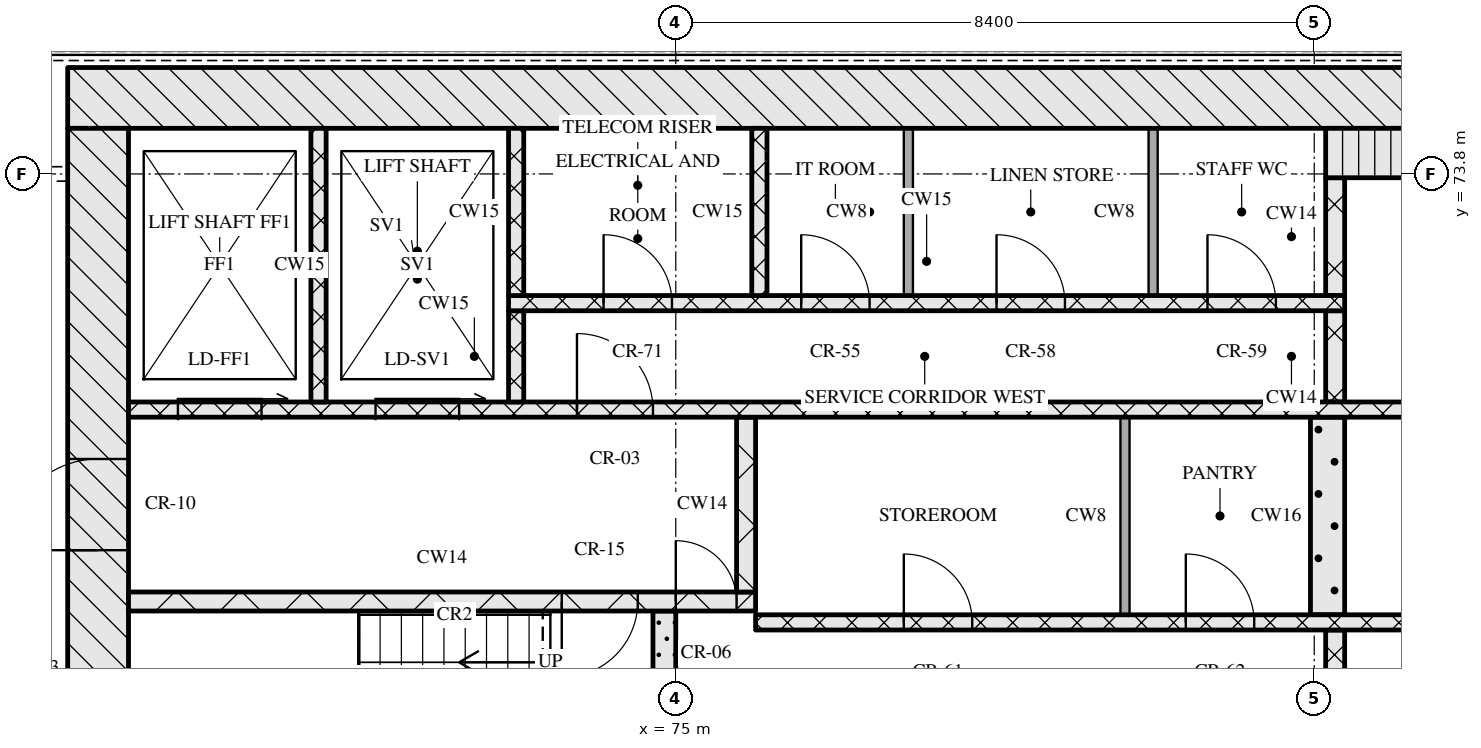
"""IFC4 building model, lengths in metres.
Left out: names, types, materials, properties, quantities, classifications, styles, units other than length and angle.
Written with IfcOpenShell. Run it as: python <this file> out.ifc"""

import sys

from ifc_helpers import new_model, si_unit, direction, frame, frame_2d, origin, place, context, subcontext, project, spatial, rectangle, extrude, element, fill, save


model = new_model("IFC4")
c1 = context("Model", 3, precision=1e-05, world=origin(), true_north=direction((0.0, 1.0)))
c2 = subcontext(c1, "Body", "Model", "MODEL_VIEW")
j1 = project(units=[si_unit("LENGTHUNIT", "METRE"), si_unit("PLANEANGLEUNIT", "RADIAN")], contexts=[c1])
p1 = place(None, origin())
s1 = spatial("IfcSite", under=j1, at=p1, CompositionType="ELEMENT")
p2 = place(p1, origin())
s2 = spatial("IfcBuilding", under=s1, at=p2, CompositionType="ELEMENT")
p3 = place(p2, frame((0.0, 0.0, 190.65)))
s3 = spatial("IfcBuildingStorey", under=s2, at=p3, CompositionType="ELEMENT", Elevation=190.65)
p4 = place(p3, frame((67.0, 74.8, 0.0), z_axis=(0.0, 0.0, 1.0), x_axis=(1.0, 0.0, 0.0)))
e1 = element("IfcWall", 1, at=p4, inside=s3, PredefinedType="SOLIDWALL", context=c2, shape_type="SweptSolid", body=[
    extrude(rectangle(XDim=41.2, YDim=0.8, at=frame_2d((20.6, 0.0))), origin(), (0.0, 0.0, 1.0), 3.3),
])
p5 = place(p3, frame((67.4, 62.4, 0.0), z_axis=(0.0, 0.0, 1.0), x_axis=(0.0, 1.0, 0.0)))
e2 = element("IfcWall", 2, at=p5, inside=s3, PredefinedType="SOLIDWALL", context=c2, shape_type="SweptSolid", body=[
    extrude(rectangle(XDim=12.0, YDim=0.8, at=frame_2d((6.0, 0.0))), origin(), (0.0, 0.0, 1.0), 3.3),
])
p6 = place(p5, frame((6.45, 0.0, 0.0)))
e3 = element("IfcOpeningElement", 3, at=p6, cuts=e2, PredefinedType="OPENING", context=c2, shape_type="SweptSolid", body=[
    extrude(rectangle(XDim=1.2, YDim=2.1, at=frame_2d((0.6, 1.05))), frame((0.0, 0.41, 0.0), z_axis=(0.0, -1.0, 0.0), x_axis=(1.0, 0.0, 0.0)), (0.0, 0.0, 1.0), 0.82),
])
p7 = place(p3, frame((74.85, 65.2, 0.0), z_axis=(0.0, 0.0, 1.0), x_axis=(0.0, 1.0, 0.0)))
e4 = element("IfcWall", 4, at=p7, inside=s3, PredefinedType="SOLIDWALL", context=c2, shape_type="SweptSolid", body=[
    extrude(rectangle(XDim=2.85, YDim=0.3, at=frame_2d((1.425, 0.0))), origin(), (0.0, 0.0, 1.0), 3.3),
])
p8 = place(p3, frame((83.675, 65.2, 0.0), z_axis=(0.0, 0.0, 1.0), x_axis=(0.0, 1.0, 0.0)))
e5 = element("IfcWall", 5, at=p8, inside=s3, PredefinedType="SOLIDWALL", context=c2, shape_type="SweptSolid", body=[
    extrude(rectangle(XDim=2.6, YDim=0.25, at=frame_2d((1.3, 0.0))), origin(), (0.0, 0.0, 1.0), 3.3),
])
p9 = place(p8, frame((0.7, 0.0, 0.0)))
e6 = element("IfcOpeningElement", 6, at=p9, cuts=e5, PredefinedType="OPENING", context=c2, shape_type="SweptSolid", body=[
    extrude(rectangle(XDim=1.2, YDim=2.1, at=frame_2d((0.6, 1.05))), frame((0.0, 0.135, 0.0), z_axis=(0.0, -1.0, 0.0), x_axis=(1.0, 0.0, 0.0)), (0.0, 0.0, 1.0), 0.27),
])
p10 = place(p3, frame((76.05, 67.9, 0.0), z_axis=(0.0, 0.0, 1.0), x_axis=(1.0, 0.0, 0.0)))
e7 = element("IfcWall", 7, at=p10, inside=s3, PredefinedType="SOLIDWALL", context=c2, shape_type="SweptSolid", body=[
    extrude(rectangle(XDim=23.1, YDim=0.2, at=frame_2d((11.55, 0.0))), origin(), (0.0, 0.0, 1.0), 3.3),
])
p11 = place(p10, frame((1.95, 0.0, 0.0)))
e8 = element("IfcOpeningElement", 8, at=p11, cuts=e7, PredefinedType="OPENING", context=c2, shape_type="SweptSolid", body=[
    extrude(rectangle(XDim=0.9, YDim=2.1, at=frame_2d((0.45, 1.05))), frame((0.0, 0.11, 0.0), z_axis=(0.0, -1.0, 0.0), x_axis=(1.0, 0.0, 0.0)), (0.0, 0.0, 1.0), 0.22),
])
p12 = place(p10, frame((5.66, 0.0, 0.0)))
e9 = element("IfcOpeningElement", 9, at=p12, cuts=e7, PredefinedType="OPENING", context=c2, shape_type="SweptSolid", body=[
    extrude(rectangle(XDim=0.9, YDim=2.1, at=frame_2d((0.45, 1.05))), frame((0.0, 0.11, 0.0), z_axis=(0.0, -1.0, 0.0), x_axis=(1.0, 0.0, 0.0)), (0.0, 0.0, 1.0), 0.22),
])
p13 = place(p10, frame((9.7, 0.0, 0.0)))
e10 = element("IfcOpeningElement", 10, at=p13, cuts=e7, PredefinedType="OPENING", context=c2, shape_type="SweptSolid", body=[
    extrude(rectangle(XDim=0.9, YDim=2.1, at=frame_2d((0.45, 1.05))), frame((0.0, 0.11, 0.0), z_axis=(0.0, -1.0, 0.0), x_axis=(1.0, 0.0, 0.0)), (0.0, 0.0, 1.0), 0.22),
])
p14 = place(p10, frame((13.55, 0.0, 0.0)))
e11 = element("IfcOpeningElement", 11, at=p14, cuts=e7, PredefinedType="OPENING", context=c2, shape_type="SweptSolid", body=[
    extrude(rectangle(XDim=1.0, YDim=2.1, at=frame_2d((0.5, 1.05))), frame((0.0, 0.11, 0.0), z_axis=(0.0, -1.0, 0.0), x_axis=(1.0, 0.0, 0.0)), (0.0, 0.0, 1.0), 0.22),
])
p15 = place(p10, frame((16.2, 0.0, 0.0)))
e12 = element("IfcOpeningElement", 12, at=p15, cuts=e7, PredefinedType="OPENING", context=c2, shape_type="SweptSolid", body=[
    extrude(rectangle(XDim=1.1, YDim=2.1, at=frame_2d((0.55, 1.05))), frame((0.0, 0.11, 0.0), z_axis=(0.0, -1.0, 0.0), x_axis=(1.0, 0.0, 0.0)), (0.0, 0.0, 1.0), 0.22),
])
p16 = place(p10, frame((18.7, 0.0, 0.0)))
e13 = element("IfcOpeningElement", 13, at=p16, cuts=e7, PredefinedType="OPENING", context=c2, shape_type="SweptSolid", body=[
    extrude(rectangle(XDim=1.1, YDim=2.1, at=frame_2d((0.55, 1.05))), frame((0.0, 0.11, 0.0), z_axis=(0.0, -1.0, 0.0), x_axis=(1.0, 0.0, 0.0)), (0.0, 0.0, 1.0), 0.22),
])
p17 = place(p10, frame((21.2, 0.0, 0.0)))
e14 = element("IfcOpeningElement", 14, at=p17, cuts=e7, PredefinedType="OPENING", context=c2, shape_type="SweptSolid", body=[
    extrude(rectangle(XDim=1.1, YDim=2.1, at=frame_2d((0.55, 1.05))), frame((0.0, 0.11, 0.0), z_axis=(0.0, -1.0, 0.0), x_axis=(1.0, 0.0, 0.0)), (0.0, 0.0, 1.0), 0.22),
])
p18 = place(p3, frame((80.91, 68.0, 0.0), z_axis=(0.0, 0.0, 1.0), x_axis=(0.0, 1.0, 0.0)))
e15 = element("IfcWall", 15, at=p18, inside=s3, PredefinedType="PARTITIONING", context=c2, shape_type="SweptSolid", body=[
    extrude(rectangle(XDim=2.6, YDim=0.12, at=frame_2d((1.3, 0.0))), origin(), (0.0, 0.0, 1.0), 3.3),
])
p19 = place(p3, frame((83.575, 68.0, 0.0), z_axis=(0.0, 0.0, 1.0), x_axis=(0.0, 1.0, 0.0)))
e16 = element("IfcWall", 16, at=p19, inside=s3, PredefinedType="SOLIDWALL", context=c2, shape_type="SweptSolid", body=[
    extrude(rectangle(XDim=2.6, YDim=0.45, at=frame_2d((1.3, 0.0))), origin(), (0.0, 0.0, 1.0), 3.3),
])
p20 = place(p3, frame((67.8, 68.175, 0.0), z_axis=(0.0, 0.0, 1.0), x_axis=(1.0, 0.0, 0.0)))
e17 = element("IfcWall", 17, at=p20, inside=s3, PredefinedType="SOLIDWALL", context=c2, shape_type="SweptSolid", body=[
    extrude(rectangle(XDim=8.25, YDim=0.25, at=frame_2d((4.125, 0.0))), origin(), (0.0, 0.0, 1.0), 3.3),
])
p21 = place(p20, frame((5.7, 0.0, 0.0)))
e18 = element("IfcOpeningElement", 18, at=p21, cuts=e17, PredefinedType="OPENING", context=c2, shape_type="SweptSolid", body=[
    extrude(rectangle(XDim=1.0, YDim=2.1, at=frame_2d((0.5, 1.05))), frame((0.0, 0.135, 0.0), z_axis=(0.0, -1.0, 0.0), x_axis=(1.0, 0.0, 0.0)), (0.0, 0.0, 1.0), 0.27),
])
p22 = place(p20, frame((7.2, 0.0, 0.0)))
e19 = element("IfcOpeningElement", 19, at=p22, cuts=e17, PredefinedType="OPENING", context=c2, shape_type="SweptSolid", body=[
    extrude(rectangle(XDim=0.8, YDim=2.1, at=frame_2d((0.4, 1.05))), frame((0.0, 0.135, 0.0), z_axis=(0.0, -1.0, 0.0), x_axis=(1.0, 0.0, 0.0)), (0.0, 0.0, 1.0), 0.27),
])
p23 = place(p3, frame((75.925, 68.3, 0.0), z_axis=(0.0, 0.0, 1.0), x_axis=(0.0, 1.0, 0.0)))
e20 = element("IfcWall", 20, at=p23, inside=s3, PredefinedType="SOLIDWALL", context=c2, shape_type="SweptSolid", body=[
    extrude(rectangle(XDim=2.3, YDim=0.25, at=frame_2d((1.15, 0.0))), origin(), (0.0, 0.0, 1.0), 3.3),
])
p24 = place(p3, frame((67.8, 70.7, 0.0), z_axis=(0.0, 0.0, 1.0), x_axis=(1.0, 0.0, 0.0)))
e21 = element("IfcWall", 21, at=p24, inside=s3, PredefinedType="SOLIDWALL", context=c2, shape_type="SweptSolid", body=[
    extrude(rectangle(XDim=39.6, YDim=0.2, at=frame_2d((19.8, 0.0))), origin(), (0.0, 0.0, 1.0), 3.3),
])
p25 = place(p24, frame((0.65, 0.0, 0.0)))
e22 = element("IfcOpeningElement", 22, at=p25, cuts=e21, PredefinedType="OPENING", context=c2, shape_type="SweptSolid", body=[
    extrude(rectangle(XDim=1.1, YDim=2.1, at=frame_2d((0.55, 1.05))), frame((0.0, 0.11, 0.0), z_axis=(0.0, -1.0, 0.0), x_axis=(1.0, 0.0, 0.0)), (0.0, 0.0, 1.0), 0.22),
])
p26 = place(p24, frame((3.25, 0.0, 0.0)))
e23 = element("IfcOpeningElement", 23, at=p26, cuts=e21, PredefinedType="OPENING", context=c2, shape_type="SweptSolid", body=[
    extrude(rectangle(XDim=1.1, YDim=2.1, at=frame_2d((0.55, 1.05))), frame((0.0, 0.11, 0.0), z_axis=(0.0, -1.0, 0.0), x_axis=(1.0, 0.0, 0.0)), (0.0, 0.0, 1.0), 0.22),
])
p27 = place(p24, frame((5.9, 0.0, 0.0)))
e24 = element("IfcOpeningElement", 24, at=p27, cuts=e21, PredefinedType="OPENING", context=c2, shape_type="SweptSolid", body=[
    extrude(rectangle(XDim=1.0, YDim=2.1, at=frame_2d((0.5, 1.05))), frame((0.0, 0.11, 0.0), z_axis=(0.0, -1.0, 0.0), x_axis=(1.0, 0.0, 0.0)), (0.0, 0.0, 1.0), 0.22),
])
p28 = place(p24, frame((21.7, 0.0, 0.0)))
e25 = element("IfcOpeningElement", 25, at=p28, cuts=e21, PredefinedType="OPENING", context=c2, shape_type="SweptSolid", body=[
    extrude(rectangle(XDim=1.0, YDim=2.1, at=frame_2d((0.5, 1.05))), frame((0.0, 0.11, 0.0), z_axis=(0.0, -1.0, 0.0), x_axis=(1.0, 0.0, 0.0)), (0.0, 0.0, 1.0), 0.22),
])
p29 = place(p24, frame((32.7, 0.0, 0.0)))
e26 = element("IfcOpeningElement", 26, at=p29, cuts=e21, PredefinedType="OPENING", context=c2, shape_type="SweptSolid", body=[
    extrude(rectangle(XDim=1.0, YDim=2.1, at=frame_2d((0.5, 1.05))), frame((0.0, 0.11, 0.0), z_axis=(0.0, -1.0, 0.0), x_axis=(1.0, 0.0, 0.0)), (0.0, 0.0, 1.0), 0.22),
])
p30 = place(p24, frame((35.25, 0.0, 0.0)))
e27 = element("IfcOpeningElement", 27, at=p30, cuts=e21, PredefinedType="OPENING", context=c2, shape_type="SweptSolid", body=[
    extrude(rectangle(XDim=1.1, YDim=2.1, at=frame_2d((0.55, 1.05))), frame((0.0, 0.11, 0.0), z_axis=(0.0, -1.0, 0.0), x_axis=(1.0, 0.0, 0.0)), (0.0, 0.0, 1.0), 0.22),
])
p31 = place(p24, frame((37.85, 0.0, 0.0)))
e28 = element("IfcOpeningElement", 28, at=p31, cuts=e21, PredefinedType="OPENING", context=c2, shape_type="SweptSolid", body=[
    extrude(rectangle(XDim=1.1, YDim=2.1, at=frame_2d((0.55, 1.05))), frame((0.0, 0.11, 0.0), z_axis=(0.0, -1.0, 0.0), x_axis=(1.0, 0.0, 0.0)), (0.0, 0.0, 1.0), 0.22),
])
p32 = place(p3, frame((70.3, 70.8, 0.0), z_axis=(0.0, 0.0, 1.0), x_axis=(0.0, 1.0, 0.0)))
e29 = element("IfcWall", 29, at=p32, inside=s3, PredefinedType="SOLIDWALL", context=c2, shape_type="SweptSolid", body=[
    extrude(rectangle(XDim=3.6, YDim=0.2, at=frame_2d((1.8, 0.0))), origin(), (0.0, 0.0, 1.0), 3.3),
])
p33 = place(p3, frame((72.9, 70.8, 0.0), z_axis=(0.0, 0.0, 1.0), x_axis=(0.0, 1.0, 0.0)))
e30 = element("IfcWall", 30, at=p33, inside=s3, PredefinedType="SOLIDWALL", context=c2, shape_type="SweptSolid", body=[
    extrude(rectangle(XDim=1.2, YDim=0.2, at=frame_2d((0.6, 0.0))), origin(), (0.0, 0.0, 1.0), 3.3),
])
p34 = place(p3, frame((83.675, 70.8, 0.0), z_axis=(0.0, 0.0, 1.0), x_axis=(0.0, 1.0, 0.0)))
e31 = element("IfcWall", 31, at=p34, inside=s3, PredefinedType="SOLIDWALL", context=c2, shape_type="SweptSolid", body=[
    extrude(rectangle(XDim=1.2, YDim=0.25, at=frame_2d((0.6, 0.0))), origin(), (0.0, 0.0, 1.0), 3.3),
])
p35 = place(p3, frame((72.8, 72.1, 0.0), z_axis=(0.0, 0.0, 1.0), x_axis=(1.0, 0.0, 0.0)))
e32 = element("IfcWall", 32, at=p35, inside=s3, PredefinedType="SOLIDWALL", context=c2, shape_type="SweptSolid", body=[
    extrude(rectangle(XDim=11.0, YDim=0.2, at=frame_2d((5.5, 0.0))), origin(), (0.0, 0.0, 1.0), 3.3),
])
p36 = place(p35, frame((1.25, 0.0, 0.0)))
e33 = element("IfcOpeningElement", 33, at=p36, cuts=e32, PredefinedType="OPENING", context=c2, shape_type="SweptSolid", body=[
    extrude(rectangle(XDim=0.9, YDim=2.1, at=frame_2d((0.45, 1.05))), frame((0.0, 0.11, 0.0), z_axis=(0.0, -1.0, 0.0), x_axis=(1.0, 0.0, 0.0)), (0.0, 0.0, 1.0), 0.22),
])
p37 = place(p35, frame((3.85, 0.0, 0.0)))
e34 = element("IfcOpeningElement", 34, at=p37, cuts=e32, PredefinedType="OPENING", context=c2, shape_type="SweptSolid", body=[
    extrude(rectangle(XDim=0.9, YDim=2.1, at=frame_2d((0.45, 1.05))), frame((0.0, 0.11, 0.0), z_axis=(0.0, -1.0, 0.0), x_axis=(1.0, 0.0, 0.0)), (0.0, 0.0, 1.0), 0.22),
])
p38 = place(p35, frame((6.42, 0.0, 0.0)))
e35 = element("IfcOpeningElement", 35, at=p38, cuts=e32, PredefinedType="OPENING", context=c2, shape_type="SweptSolid", body=[
    extrude(rectangle(XDim=0.9, YDim=2.1, at=frame_2d((0.45, 1.05))), frame((0.0, 0.11, 0.0), z_axis=(0.0, -1.0, 0.0), x_axis=(1.0, 0.0, 0.0)), (0.0, 0.0, 1.0), 0.22),
])
p39 = place(p35, frame((9.195, 0.0, 0.0)))
e36 = element("IfcOpeningElement", 36, at=p39, cuts=e32, PredefinedType="OPENING", context=c2, shape_type="SweptSolid", body=[
    extrude(rectangle(XDim=0.9, YDim=2.1, at=frame_2d((0.45, 1.05))), frame((0.0, 0.11, 0.0), z_axis=(0.0, -1.0, 0.0), x_axis=(1.0, 0.0, 0.0)), (0.0, 0.0, 1.0), 0.22),
])
for number, where, z_axis, x_axis in (
    (37, (72.9, 72.2, 0.0), (0.0, 0.0, 1.0), (0.0, 1.0, 0.0)),
    (38, (76.1, 72.2, 0.0), (0.0, 0.0, 1.0), (0.0, 1.0, 0.0)),
):
    element("IfcWall", number, at=place(p3, frame(where, z_axis=z_axis, x_axis=x_axis)), inside=s3, PredefinedType="SOLIDWALL", context=c2, shape_type="SweptSolid", body=[
        extrude(rectangle(XDim=2.2, YDim=0.2, at=frame_2d((1.1, 0.0))), origin(), (0.0, 0.0, 1.0), 3.3),
    ])
for number, where, z_axis, x_axis in (
    (39, (78.06, 72.2, 0.0), (0.0, 0.0, 1.0), (0.0, 1.0, 0.0)),
    (40, (81.28, 72.2, 0.0), (0.0, 0.0, 1.0), (0.0, 1.0, 0.0)),
):
    element("IfcWall", number, at=place(p3, frame(where, z_axis=z_axis, x_axis=x_axis)), inside=s3, PredefinedType="PARTITIONING", context=c2, shape_type="SweptSolid", body=[
        extrude(rectangle(XDim=2.2, YDim=0.12, at=frame_2d((1.1, 0.0))), origin(), (0.0, 0.0, 1.0), 3.3),
    ])
p40 = place(p3, frame((83.675, 72.2, 0.0), z_axis=(0.0, 0.0, 1.0), x_axis=(0.0, 1.0, 0.0)))
e41 = element("IfcWall", 41, at=p40, inside=s3, PredefinedType="SOLIDWALL", context=c2, shape_type="SweptSolid", body=[
    extrude(rectangle(XDim=1.55, YDim=0.25, at=frame_2d((0.775, 0.0))), origin(), (0.0, 0.0, 1.0), 3.3),
])
p41 = place(p3, frame((83.55, 74.075, 0.0), z_axis=(0.0, 0.0, 1.0), x_axis=(1.0, 0.0, 0.0)))
e42 = element("IfcWall", 42, at=p41, inside=s3, PredefinedType="SOLIDWALL", context=c2, shape_type="SweptSolid", body=[
    extrude(rectangle(XDim=8.1, YDim=0.65, at=frame_2d((4.05, 0.0))), origin(), (0.0, 0.0, 1.0), 3.3),
])
p42 = place(p11, origin())
e43 = element("IfcDoor", 43, at=p42, inside=s3, OperationType="SINGLE_SWING_LEFT", PredefinedType="DOOR", context=c2, shape_type="SweptSolid", body=[
    extrude(rectangle(XDim=0.9, YDim=2.1, at=frame_2d((0.45, 1.05))), frame((0.0, 0.025, 0.0), z_axis=(0.0, -1.0, 0.0), x_axis=(1.0, 0.0, 0.0)), (0.0, 0.0, 1.0), 0.05),
])
fill(e8, e43)
p43 = place(p12, origin())
e44 = element("IfcDoor", 44, at=p43, inside=s3, OperationType="SINGLE_SWING_LEFT", PredefinedType="DOOR", context=c2, shape_type="SweptSolid", body=[
    extrude(rectangle(XDim=0.9, YDim=2.1, at=frame_2d((0.45, 1.05))), frame((0.0, 0.025, 0.0), z_axis=(0.0, -1.0, 0.0), x_axis=(1.0, 0.0, 0.0)), (0.0, 0.0, 1.0), 0.05),
])
fill(e9, e44)
p44 = place(p21, origin())
e45 = element("IfcDoor", 45, at=p44, inside=s3, OperationType="SINGLE_SWING_RIGHT", PredefinedType="DOOR", context=c2, shape_type="SweptSolid", body=[
    extrude(rectangle(XDim=1.0, YDim=2.1, at=frame_2d((0.5, 1.05))), frame((0.0, 0.025, 0.0), z_axis=(0.0, -1.0, 0.0), x_axis=(1.0, 0.0, 0.0)), (0.0, 0.0, 1.0), 0.05),
])
fill(e18, e45)
p45 = place(p22, origin())
e46 = element("IfcDoor", 46, at=p45, inside=s3, OperationType="SINGLE_SWING_LEFT", PredefinedType="DOOR", context=c2, shape_type="SweptSolid", body=[
    extrude(rectangle(XDim=0.8, YDim=2.1, at=frame_2d((0.4, 1.05))), frame((0.0, 0.025, 0.0), z_axis=(0.0, -1.0, 0.0), x_axis=(1.0, 0.0, 0.0)), (0.0, 0.0, 1.0), 0.05),
])
fill(e19, e46)
p46 = place(p6, origin())
e47 = element("IfcDoor", 47, at=p46, inside=s3, OperationType="SINGLE_SWING_LEFT", PredefinedType="DOOR", context=c2, shape_type="SweptSolid", body=[
    extrude(rectangle(XDim=1.2, YDim=2.1, at=frame_2d((0.6, 1.05))), frame((0.0, 0.025, 0.0), z_axis=(0.0, -1.0, 0.0), x_axis=(1.0, 0.0, 0.0)), (0.0, 0.0, 1.0), 0.05),
])
fill(e3, e47)
p47 = place(p25, origin())
e48 = element("IfcDoor", 48, at=p47, inside=s3, OperationType="SLIDING_TO_RIGHT", PredefinedType="DOOR", context=c2, shape_type="SweptSolid", body=[
    extrude(rectangle(XDim=1.1, YDim=2.1, at=frame_2d((0.55, 1.05))), frame((0.0, 0.025, 0.0), z_axis=(0.0, -1.0, 0.0), x_axis=(1.0, 0.0, 0.0)), (0.0, 0.0, 1.0), 0.05),
])
fill(e22, e48)
p48 = place(p26, origin())
e49 = element("IfcDoor", 49, at=p48, inside=s3, OperationType="SLIDING_TO_RIGHT", PredefinedType="DOOR", context=c2, shape_type="SweptSolid", body=[
    extrude(rectangle(XDim=1.1, YDim=2.1, at=frame_2d((0.55, 1.05))), frame((0.0, 0.025, 0.0), z_axis=(0.0, -1.0, 0.0), x_axis=(1.0, 0.0, 0.0)), (0.0, 0.0, 1.0), 0.05),
])
fill(e23, e49)
p49 = place(p27, origin())
e50 = element("IfcDoor", 50, at=p49, inside=s3, OperationType="SINGLE_SWING_LEFT", PredefinedType="DOOR", context=c2, shape_type="SweptSolid", body=[
    extrude(rectangle(XDim=1.0, YDim=2.1, at=frame_2d((0.5, 1.05))), frame((0.0, 0.025, 0.0), z_axis=(0.0, -1.0, 0.0), x_axis=(1.0, 0.0, 0.0)), (0.0, 0.0, 1.0), 0.05),
])
fill(e24, e50)
p50 = place(p36, origin())
e51 = element("IfcDoor", 51, at=p50, inside=s3, OperationType="SINGLE_SWING_LEFT", PredefinedType="DOOR", context=c2, shape_type="SweptSolid", body=[
    extrude(rectangle(XDim=0.9, YDim=2.1, at=frame_2d((0.45, 1.05))), frame((0.0, 0.025, 0.0), z_axis=(0.0, -1.0, 0.0), x_axis=(1.0, 0.0, 0.0)), (0.0, 0.0, 1.0), 0.05),
])
fill(e33, e51)
p51 = place(p37, origin())
e52 = element("IfcDoor", 52, at=p51, inside=s3, OperationType="SINGLE_SWING_LEFT", PredefinedType="DOOR", context=c2, shape_type="SweptSolid", body=[
    extrude(rectangle(XDim=0.9, YDim=2.1, at=frame_2d((0.45, 1.05))), frame((0.0, 0.025, 0.0), z_axis=(0.0, -1.0, 0.0), x_axis=(1.0, 0.0, 0.0)), (0.0, 0.0, 1.0), 0.05),
])
fill(e34, e52)
p52 = place(p38, origin())
e53 = element("IfcDoor", 53, at=p52, inside=s3, OperationType="SINGLE_SWING_LEFT", PredefinedType="DOOR", context=c2, shape_type="SweptSolid", body=[
    extrude(rectangle(XDim=0.9, YDim=2.1, at=frame_2d((0.45, 1.05))), frame((0.0, 0.025, 0.0), z_axis=(0.0, -1.0, 0.0), x_axis=(1.0, 0.0, 0.0)), (0.0, 0.0, 1.0), 0.05),
])
fill(e35, e53)
p53 = place(p39, origin())
e54 = element("IfcDoor", 54, at=p53, inside=s3, OperationType="SINGLE_SWING_LEFT", PredefinedType="DOOR", context=c2, shape_type="SweptSolid", body=[
    extrude(rectangle(XDim=0.9, YDim=2.1, at=frame_2d((0.45, 1.05))), frame((0.0, 0.025, 0.0), z_axis=(0.0, -1.0, 0.0), x_axis=(1.0, 0.0, 0.0)), (0.0, 0.0, 1.0), 0.05),
])
fill(e36, e54)
save(model, sys.argv[1])
